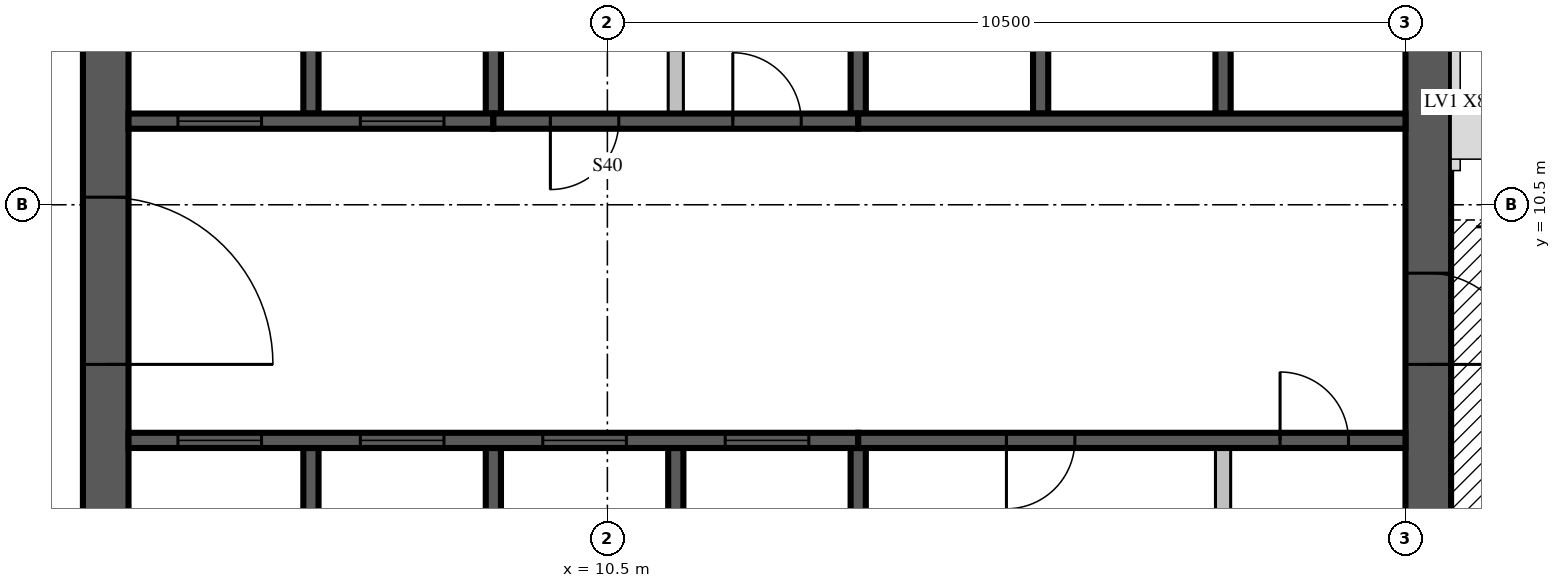
"""IFC4 building model, lengths in metres.
Left out: names, types, materials, properties, quantities, classifications, styles, units other than length and angle.
Written with IfcOpenShell. Run it as: python <this file> out.ifc"""

import sys

from ifc_helpers import new_model, si_unit, direction, frame, frame_2d, origin, place, context, subcontext, project, spatial, rectangle, extrude, source, transform, mapped, element, fill, save


model = new_model("IFC4")
c1 = context("Model", 3, precision=1e-05, world=origin(), true_north=direction((0.0, 1.0)))
c2 = subcontext(c1, "Body", "Model", "MODEL_VIEW")
j1 = project(units=[si_unit("LENGTHUNIT", "METRE"), si_unit("PLANEANGLEUNIT", "RADIAN")], contexts=[c1])
p1 = place(None, origin())
s1 = spatial("IfcSite", under=j1, at=p1, CompositionType="ELEMENT")
p2 = place(p1, origin())
s2 = spatial("IfcBuilding", under=s1, at=p2, CompositionType="ELEMENT")
p3 = place(p2, frame((0.0, 0.0, 333.5)))
s3 = spatial("IfcBuildingStorey", under=s2, at=p3, CompositionType="ELEMENT", Elevation=333.5)
m1 = source(origin(), c2, "Body", "SweptSolid", [
    extrude(rectangle(XDim=17.4, YDim=0.6, at=frame_2d((8.7, 0.0))), origin(), (0.0, 0.0, 1.0), 3.5),
])
p4 = place(p3, frame((3.9, 4.2, 0.0), z_axis=(0.0, 0.0, 1.0), x_axis=(0.0, 1.0, 0.0)))
e1 = element("IfcWall", 1, at=p4, inside=s3, PredefinedType="SHEAR", context=c2, shape_type="MappedRepresentation", body=[
    mapped(m1, transform((0.0, 0.0, 0.0), scale=1.0)),
])
m2 = source(origin(), c2, "Body", "SweptSolid", [
    extrude(rectangle(XDim=2.2, YDim=2.1, at=frame_2d((1.1, 1.05))), frame((0.0, 0.31, 0.0), z_axis=(0.0, -1.0, 0.0), x_axis=(1.0, 0.0, 0.0)), (0.0, 0.0, 1.0), 0.62),
])
p5 = place(p4, frame((4.2, 0.0, 0.0)))
e2 = element("IfcOpeningElement", 2, at=p5, cuts=e1, PredefinedType="OPENING", context=c2, shape_type="MappedRepresentation", body=[
    mapped(m2, transform((0.0, 0.0, 0.0), scale=1.0)),
])
p6 = place(p3, frame((21.3, 4.2, 0.0), z_axis=(0.0, 0.0, 1.0), x_axis=(0.0, 1.0, 0.0)))
e3 = element("IfcWall", 3, at=p6, inside=s3, PredefinedType="SHEAR", context=c2, shape_type="SweptSolid", body=[
    extrude(rectangle(XDim=16.8, YDim=0.6, at=frame_2d((8.4, 0.0))), origin(), (0.0, 0.0, 1.0), 3.5),
])
m3 = source(origin(), c2, "Body", "SweptSolid", [
    extrude(rectangle(XDim=1.2, YDim=2.1, at=frame_2d((0.6, 1.05))), frame((0.0, 0.31, 0.0), z_axis=(0.0, -1.0, 0.0), x_axis=(1.0, 0.0, 0.0)), (0.0, 0.0, 1.0), 0.62),
])
p7 = place(p6, frame((4.2, 0.0, 0.0)))
e4 = element("IfcOpeningElement", 4, at=p7, cuts=e3, PredefinedType="OPENING", context=c2, shape_type="MappedRepresentation", body=[
    mapped(m3, transform((0.0, 0.0, 0.0), scale=1.0)),
])
m4 = source(origin(), c2, "Body", "SweptSolid", [
    extrude(rectangle(XDim=1.2, YDim=2.4, at=frame_2d((0.6, 1.2))), frame((0.0, 0.31, 0.0), z_axis=(0.0, -1.0, 0.0), x_axis=(1.0, 0.0, 0.0)), (0.0, 0.0, 1.0), 0.62),
])
p8 = place(p6, frame((12.0, 0.0, 0.6)))
e5 = element("IfcOpeningElement", 5, at=p8, cuts=e3, PredefinedType="OPENING", context=c2, shape_type="MappedRepresentation", body=[
    mapped(m4, transform((0.0, 0.0, 0.0), scale=1.0)),
])
m5 = source(origin(), c2, "Body", "SweptSolid", [
    extrude(rectangle(XDim=3.1, YDim=0.2, at=frame_2d((1.55, 0.0))), origin(), (0.0, 0.0, 1.0), 3.5),
])
for number, where, z_axis, x_axis in (
    (6, (6.6, 4.2, 0.0), (0.0, 0.0, 1.0), (0.0, 1.0, 0.0)),
    (7, (9.0, 4.2, 0.0), (0.0, 0.0, 1.0), (0.0, 1.0, 0.0)),
    (8, (11.4, 4.2, 0.0), (0.0, 0.0, 1.0), (0.0, 1.0, 0.0)),
):
    element("IfcWall", number, at=place(p3, frame(where, z_axis=z_axis, x_axis=x_axis)), inside=s3, PredefinedType="SOLIDWALL", context=c2, shape_type="MappedRepresentation", body=[
        mapped(m5, transform((0.0, 0.0, 0.0), scale=1.0)),
    ])
m6 = source(origin(), c2, "Body", "SweptSolid", [
    extrude(rectangle(XDim=3.1, YDim=0.2, at=frame_2d((1.55, 0.0))), origin(), (0.0, 0.0, 1.0), 3.1),
])
p9 = place(p3, frame((13.8, 4.2, 0.0), z_axis=(0.0, 0.0, 1.0), x_axis=(0.0, 1.0, 0.0)))
e9 = element("IfcWall", 9, at=p9, inside=s3, PredefinedType="SOLIDWALL", context=c2, shape_type="MappedRepresentation", body=[
    mapped(m6, transform((0.0, 0.0, 0.0), scale=1.0)),
])
m7 = source(origin(), c2, "Body", "SweptSolid", [
    extrude(rectangle(XDim=3.1, YDim=0.2, at=frame_2d((1.55, 0.0))), origin(), (0.0, 0.0, 1.0), 3.1),
])
p10 = place(p3, frame((18.6, 4.2, 0.0), z_axis=(0.0, 0.0, 1.0), x_axis=(0.0, 1.0, 0.0)))
e10 = element("IfcWall", 10, at=p10, inside=s3, PredefinedType="PARTITIONING", context=c2, shape_type="MappedRepresentation", body=[
    mapped(m7, transform((0.0, 0.0, 0.0), scale=1.0)),
])
m8 = source(origin(), c2, "Body", "SweptSolid", [
    extrude(rectangle(XDim=3.0, YDim=0.2, at=frame_2d((1.5, 0.0))), origin(), (0.0, 0.0, 1.0), 3.5),
])
p11 = place(p3, frame((6.6, 11.7, 0.0), z_axis=(0.0, 0.0, 1.0), x_axis=(0.0, 1.0, 0.0)))
e11 = element("IfcWall", 11, at=p11, inside=s3, PredefinedType="SOLIDWALL", context=c2, shape_type="MappedRepresentation", body=[
    mapped(m8, transform((0.0, 0.0, 0.0), scale=1.0)),
])
m9 = source(origin(), c2, "Body", "SweptSolid", [
    extrude(rectangle(XDim=3.0, YDim=0.2, at=frame_2d((1.5, 0.0))), origin(), (0.0, 0.0, 1.0), 3.1),
])
for number, where, z_axis, x_axis in (
    (12, (9.0, 11.7, 0.0), (0.0, 0.0, 1.0), (0.0, 1.0, 0.0)),
    (13, (13.8, 11.7, 0.0), (0.0, 0.0, 1.0), (0.0, 1.0, 0.0)),
):
    element("IfcWall", number, at=place(p3, frame(where, z_axis=z_axis, x_axis=x_axis)), inside=s3, PredefinedType="SOLIDWALL", context=c2, shape_type="MappedRepresentation", body=[
        mapped(m9, transform((0.0, 0.0, 0.0), scale=1.0)),
    ])
for number, where, z_axis, x_axis in (
    (14, (16.2, 11.7, 0.0), (0.0, 0.0, 1.0), (0.0, 1.0, 0.0)),
    (15, (18.6, 11.7, 0.0), (0.0, 0.0, 1.0), (0.0, 1.0, 0.0)),
):
    element("IfcWall", number, at=place(p3, frame(where, z_axis=z_axis, x_axis=x_axis)), inside=s3, PredefinedType="SOLIDWALL", context=c2, shape_type="MappedRepresentation", body=[
        mapped(m8, transform((0.0, 0.0, 0.0), scale=1.0)),
    ])
m10 = source(origin(), c2, "Body", "SweptSolid", [
    extrude(rectangle(XDim=3.0, YDim=0.2, at=frame_2d((1.5, 0.0))), origin(), (0.0, 0.0, 1.0), 3.1),
])
p12 = place(p3, frame((11.4, 11.7, 0.0), z_axis=(0.0, 0.0, 1.0), x_axis=(0.0, 1.0, 0.0)))
e16 = element("IfcWall", 16, at=p12, inside=s3, PredefinedType="PARTITIONING", context=c2, shape_type="MappedRepresentation", body=[
    mapped(m10, transform((0.0, 0.0, 0.0), scale=1.0)),
])
m11 = source(origin(), c2, "Body", "SweptSolid", [
    extrude(rectangle(XDim=9.6, YDim=0.2, at=frame_2d((4.8, 0.0))), origin(), (0.0, 0.0, 1.0), 3.5),
])
p13 = place(p3, frame((4.2, 7.4, 0.0), z_axis=(0.0, 0.0, 1.0), x_axis=(1.0, 0.0, 0.0)))
e17 = element("IfcWall", 17, at=p13, inside=s3, PredefinedType="SOLIDWALL", context=c2, shape_type="MappedRepresentation", body=[
    mapped(m11, transform((0.0, 0.0, 0.0), scale=1.0)),
])
m12 = source(origin(), c2, "Body", "SweptSolid", [
    extrude(rectangle(XDim=1.1, YDim=2.1, at=frame_2d((0.55, 1.05))), frame((0.0, 0.11, 0.0), z_axis=(0.0, -1.0, 0.0), x_axis=(1.0, 0.0, 0.0)), (0.0, 0.0, 1.0), 0.22),
])
p14 = place(p13, frame((0.65, 0.0, 0.0)))
e18 = element("IfcOpeningElement", 18, at=p14, cuts=e17, PredefinedType="OPENING", context=c2, shape_type="MappedRepresentation", body=[
    mapped(m12, transform((0.0, 0.0, 0.0), scale=1.0)),
])
p15 = place(p13, frame((3.05, 0.0, 0.0)))
e19 = element("IfcOpeningElement", 19, at=p15, cuts=e17, PredefinedType="OPENING", context=c2, shape_type="MappedRepresentation", body=[
    mapped(m12, transform((0.0, 0.0, 0.0), scale=1.0)),
])
p16 = place(p13, frame((5.45, 0.0, 0.0)))
e20 = element("IfcOpeningElement", 20, at=p16, cuts=e17, PredefinedType="OPENING", context=c2, shape_type="MappedRepresentation", body=[
    mapped(m12, transform((0.0, 0.0, 0.0), scale=1.0)),
])
p17 = place(p13, frame((7.85, 0.0, 0.0)))
e21 = element("IfcOpeningElement", 21, at=p17, cuts=e17, PredefinedType="OPENING", context=c2, shape_type="MappedRepresentation", body=[
    mapped(m12, transform((0.0, 0.0, 0.0), scale=1.0)),
])
m13 = source(origin(), c2, "Body", "SweptSolid", [
    extrude(rectangle(XDim=7.2, YDim=0.2, at=frame_2d((3.6, 0.0))), origin(), (0.0, 0.0, 1.0), 3.1),
])
p18 = place(p3, frame((13.8, 7.4, 0.0), z_axis=(0.0, 0.0, 1.0), x_axis=(1.0, 0.0, 0.0)))
e22 = element("IfcWall", 22, at=p18, inside=s3, PredefinedType="SOLIDWALL", context=c2, shape_type="MappedRepresentation", body=[
    mapped(m13, transform((0.0, 0.0, 0.0), scale=1.0)),
])
m14 = source(origin(), c2, "Body", "SweptSolid", [
    extrude(rectangle(XDim=0.9, YDim=2.1, at=frame_2d((0.45, 1.05))), frame((0.0, 0.11, 0.0), z_axis=(0.0, -1.0, 0.0), x_axis=(1.0, 0.0, 0.0)), (0.0, 0.0, 1.0), 0.22),
])
p19 = place(p18, frame((1.95, 0.0, 0.0)))
e23 = element("IfcOpeningElement", 23, at=p19, cuts=e22, PredefinedType="OPENING", context=c2, shape_type="MappedRepresentation", body=[
    mapped(m14, transform((0.0, 0.0, 0.0), scale=1.0)),
])
p20 = place(p18, frame((5.55, 0.0, 0.0)))
e24 = element("IfcOpeningElement", 24, at=p20, cuts=e22, PredefinedType="OPENING", context=c2, shape_type="MappedRepresentation", body=[
    mapped(m14, transform((0.0, 0.0, 0.0), scale=1.0)),
])
m15 = source(origin(), c2, "Body", "SweptSolid", [
    extrude(rectangle(XDim=4.8, YDim=0.2, at=frame_2d((2.4, 0.0))), origin(), (0.0, 0.0, 1.0), 3.5),
])
p21 = place(p3, frame((4.2, 11.6, 0.0), z_axis=(0.0, 0.0, 1.0), x_axis=(1.0, 0.0, 0.0)))
e25 = element("IfcWall", 25, at=p21, inside=s3, PredefinedType="SOLIDWALL", context=c2, shape_type="MappedRepresentation", body=[
    mapped(m15, transform((0.0, 0.0, 0.0), scale=1.0)),
])
p22 = place(p21, frame((0.65, 0.0, 0.0)))
e26 = element("IfcOpeningElement", 26, at=p22, cuts=e25, PredefinedType="OPENING", context=c2, shape_type="MappedRepresentation", body=[
    mapped(m12, transform((0.0, 0.0, 0.0), scale=1.0)),
])
p23 = place(p21, frame((3.05, 0.0, 0.0)))
e27 = element("IfcOpeningElement", 27, at=p23, cuts=e25, PredefinedType="OPENING", context=c2, shape_type="MappedRepresentation", body=[
    mapped(m12, transform((0.0, 0.0, 0.0), scale=1.0)),
])
m16 = source(origin(), c2, "Body", "SweptSolid", [
    extrude(rectangle(XDim=4.8, YDim=0.2, at=frame_2d((2.4, 0.0))), origin(), (0.0, 0.0, 1.0), 3.1),
])
p24 = place(p3, frame((9.0, 11.6, 0.0), z_axis=(0.0, 0.0, 1.0), x_axis=(1.0, 0.0, 0.0)))
e28 = element("IfcWall", 28, at=p24, inside=s3, PredefinedType="SOLIDWALL", context=c2, shape_type="MappedRepresentation", body=[
    mapped(m16, transform((0.0, 0.0, 0.0), scale=1.0)),
])
p25 = place(p24, frame((0.75, 0.0, 0.0)))
e29 = element("IfcOpeningElement", 29, at=p25, cuts=e28, PredefinedType="OPENING", context=c2, shape_type="MappedRepresentation", body=[
    mapped(m14, transform((0.0, 0.0, 0.0), scale=1.0)),
])
p26 = place(p24, frame((3.15, 0.0, 0.0)))
e30 = element("IfcOpeningElement", 30, at=p26, cuts=e28, PredefinedType="OPENING", context=c2, shape_type="MappedRepresentation", body=[
    mapped(m14, transform((0.0, 0.0, 0.0), scale=1.0)),
])
m17 = source(origin(), c2, "Body", "SweptSolid", [
    extrude(rectangle(XDim=7.2, YDim=0.2, at=frame_2d((3.6, 0.0))), origin(), (0.0, 0.0, 1.0), 3.5),
])
p27 = place(p3, frame((13.8, 11.6, 0.0), z_axis=(0.0, 0.0, 1.0), x_axis=(1.0, 0.0, 0.0)))
e31 = element("IfcWall", 31, at=p27, inside=s3, PredefinedType="SOLIDWALL", context=c2, shape_type="MappedRepresentation", body=[
    mapped(m17, transform((0.0, 0.0, 0.0), scale=1.0)),
])
m18 = source(origin(), c2, "Body", "SweptSolid", [
    extrude(rectangle(XDim=1.1, YDim=2.1, at=frame_2d((0.55, 1.05))), frame((0.0, 0.025, 0.0), z_axis=(0.0, -1.0, 0.0), x_axis=(1.0, 0.0, 0.0)), (0.0, 0.0, 1.0), 0.05),
])
p28 = place(p14, origin())
e32 = element("IfcDoor", 32, at=p28, inside=s3, OperationType="SLIDING_TO_LEFT", PredefinedType="DOOR", context=c2, shape_type="MappedRepresentation", body=[
    mapped(m18, transform((0.0, 0.0, 0.0), scale=1.0)),
])
fill(e18, e32)
p29 = place(p15, origin())
e33 = element("IfcDoor", 33, at=p29, inside=s3, OperationType="SLIDING_TO_LEFT", PredefinedType="DOOR", context=c2, shape_type="MappedRepresentation", body=[
    mapped(m18, transform((0.0, 0.0, 0.0), scale=1.0)),
])
fill(e19, e33)
p30 = place(p16, origin())
e34 = element("IfcDoor", 34, at=p30, inside=s3, OperationType="SLIDING_TO_LEFT", PredefinedType="DOOR", context=c2, shape_type="MappedRepresentation", body=[
    mapped(m18, transform((0.0, 0.0, 0.0), scale=1.0)),
])
fill(e20, e34)
p31 = place(p17, origin())
e35 = element("IfcDoor", 35, at=p31, inside=s3, OperationType="SLIDING_TO_LEFT", PredefinedType="DOOR", context=c2, shape_type="MappedRepresentation", body=[
    mapped(m18, transform((0.0, 0.0, 0.0), scale=1.0)),
])
fill(e21, e35)
m19 = source(origin(), c2, "Body", "SweptSolid", [
    extrude(rectangle(XDim=0.9, YDim=2.1, at=frame_2d((0.45, 1.05))), frame((0.0, 0.025, 0.0), z_axis=(0.0, -1.0, 0.0), x_axis=(1.0, 0.0, 0.0)), (0.0, 0.0, 1.0), 0.05),
])
p32 = place(p19, origin())
e36 = element("IfcDoor", 36, at=p32, inside=s3, OperationType="SINGLE_SWING_RIGHT", PredefinedType="DOOR", context=c2, shape_type="MappedRepresentation", body=[
    mapped(m19, transform((0.0, 0.0, 0.0), scale=1.0)),
])
fill(e23, e36)
p33 = place(p20, origin())
e37 = element("IfcDoor", 37, at=p33, inside=s3, OperationType="SINGLE_SWING_LEFT", PredefinedType="DOOR", context=c2, shape_type="MappedRepresentation", body=[
    mapped(m19, transform((0.0, 0.0, 0.0), scale=1.0)),
])
fill(e24, e37)
p34 = place(p22, origin())
e38 = element("IfcDoor", 38, at=p34, inside=s3, OperationType="SLIDING_TO_LEFT", PredefinedType="DOOR", context=c2, shape_type="MappedRepresentation", body=[
    mapped(m18, transform((0.0, 0.0, 0.0), scale=1.0)),
])
fill(e26, e38)
p35 = place(p23, origin())
e39 = element("IfcDoor", 39, at=p35, inside=s3, OperationType="SLIDING_TO_LEFT", PredefinedType="DOOR", context=c2, shape_type="MappedRepresentation", body=[
    mapped(m18, transform((0.0, 0.0, 0.0), scale=1.0)),
])
fill(e27, e39)
p36 = place(p25, origin())
e40 = element("IfcDoor", 40, at=p36, inside=s3, OperationType="SINGLE_SWING_RIGHT", PredefinedType="DOOR", context=c2, shape_type="MappedRepresentation", body=[
    mapped(m19, transform((0.0, 0.0, 0.0), scale=1.0)),
])
fill(e29, e40)
p37 = place(p26, origin())
e41 = element("IfcDoor", 41, at=p37, inside=s3, OperationType="SINGLE_SWING_LEFT", PredefinedType="DOOR", context=c2, shape_type="MappedRepresentation", body=[
    mapped(m19, transform((0.0, 0.0, 0.0), scale=1.0)),
])
fill(e30, e41)
m20 = source(origin(), c2, "Body", "SweptSolid", [
    extrude(rectangle(XDim=2.2, YDim=2.1, at=frame_2d((1.1, 1.05))), frame((0.0, 0.025, 0.0), z_axis=(0.0, -1.0, 0.0), x_axis=(1.0, 0.0, 0.0)), (0.0, 0.0, 1.0), 0.05),
])
p38 = place(p5, origin())
e42 = element("IfcDoor", 42, at=p38, inside=s3, OperationType="DOUBLE_DOOR_SINGLE_SWING", PredefinedType="DOOR", context=c2, shape_type="MappedRepresentation", body=[
    mapped(m20, transform((0.0, 0.0, 0.0), scale=1.0)),
])
fill(e2, e42)
m21 = source(origin(), c2, "Body", "SweptSolid", [
    extrude(rectangle(XDim=1.2, YDim=2.1, at=frame_2d((0.6, 1.05))), frame((0.0, 0.025, 0.0), z_axis=(0.0, -1.0, 0.0), x_axis=(1.0, 0.0, 0.0)), (0.0, 0.0, 1.0), 0.05),
])
p39 = place(p7, origin())
e43 = element("IfcDoor", 43, at=p39, inside=s3, OperationType="SINGLE_SWING_RIGHT", PredefinedType="DOOR", context=c2, shape_type="MappedRepresentation", body=[
    mapped(m21, transform((0.0, 0.0, 0.0), scale=1.0)),
])
fill(e4, e43)
save(model, sys.argv[1])
